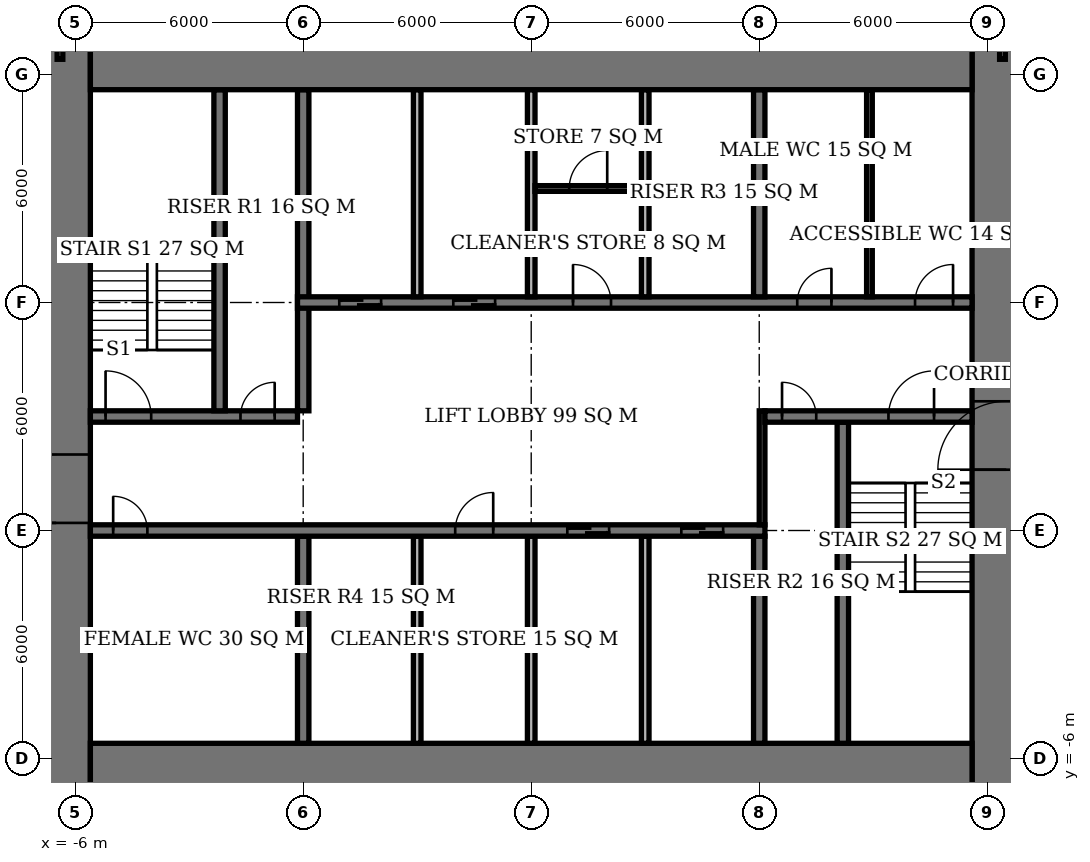
"""IFC4 building model, lengths in metres.
Left out: names, types, materials, properties, quantities, classifications, styles, units other than length and angle.
Written with IfcOpenShell. Run it as: python <this file> out.ifc"""

import sys

from ifc_helpers import new_model, si_unit, direction, frame, frame_2d, origin, place, context, subcontext, project, spatial, rectangle, extrude, element, fill, save


model = new_model("IFC4")
c1 = context("Model", 3, precision=1e-05, world=origin(), true_north=direction((0.0, 1.0)))
c2 = subcontext(c1, "Body", "Model", "MODEL_VIEW")
j1 = project(units=[si_unit("LENGTHUNIT", "METRE"), si_unit("PLANEANGLEUNIT", "RADIAN")], contexts=[c1])
p1 = place(None, origin())
s1 = spatial("IfcSite", under=j1, at=p1, CompositionType="ELEMENT")
p2 = place(p1, origin())
s2 = spatial("IfcBuilding", under=s1, at=p2, CompositionType="ELEMENT")
p3 = place(p2, frame((0.0, 0.0, 208.4)))
s3 = spatial("IfcBuildingStorey", under=s2, at=p3, CompositionType="ELEMENT", Elevation=208.4)
for number, where, z_axis, x_axis in (
    (1, (-5.6, -6.6, 0.0), (0.0, 0.0, 1.0), (1.0, 0.0, 0.0)),
    (2, (-5.6, 12.6, 0.0), (0.0, 0.0, 1.0), (1.0, 0.0, 0.0)),
):
    element("IfcWall", number, at=place(p3, frame(where, z_axis=z_axis, x_axis=x_axis)), inside=s3, PredefinedType="SHEAR", context=c2, shape_type="SweptSolid", body=[
        extrude(rectangle(XDim=23.2, YDim=2.0, at=frame_2d((11.6, 0.0))), origin(), (0.0, 0.0, 1.0), 3.9),
    ])
p4 = place(p3, frame((-6.5, -7.6, 0.0), z_axis=(0.0, 0.0, 1.0), x_axis=(0.0, 1.0, 0.0)))
e3 = element("IfcWall", 3, at=p4, inside=s3, PredefinedType="SHEAR", context=c2, shape_type="SweptSolid", body=[
    extrude(rectangle(XDim=21.2, YDim=1.8, at=frame_2d((10.6, 0.0))), origin(), (0.0, 0.0, 1.0), 3.9),
])
p5 = place(p4, frame((7.8, 0.0, 0.0)))
e4 = element("IfcOpeningElement", 4, at=p5, cuts=e3, PredefinedType="OPENING", context=c2, shape_type="SweptSolid", body=[
    extrude(rectangle(XDim=1.8, YDim=2.4, at=frame_2d((0.9, 1.2))), frame((0.0, 0.91, 0.0), z_axis=(0.0, -1.0, 0.0), x_axis=(1.0, 0.0, 0.0)), (0.0, 0.0, 1.0), 1.82),
])
p6 = place(p3, frame((18.5, -7.6, 0.0), z_axis=(0.0, 0.0, 1.0), x_axis=(0.0, 1.0, 0.0)))
e5 = element("IfcWall", 5, at=p6, inside=s3, PredefinedType="SHEAR", context=c2, shape_type="SweptSolid", body=[
    extrude(rectangle(XDim=21.2, YDim=1.8, at=frame_2d((10.6, 0.0))), origin(), (0.0, 0.0, 1.0), 3.9),
])
p7 = place(p6, frame((9.2, 0.0, 0.0)))
e6 = element("IfcOpeningElement", 6, at=p7, cuts=e5, PredefinedType="OPENING", context=c2, shape_type="SweptSolid", body=[
    extrude(rectangle(XDim=1.8, YDim=2.4, at=frame_2d((0.9, 1.2))), frame((0.0, 0.91, 0.0), z_axis=(0.0, -1.0, 0.0), x_axis=(1.0, 0.0, 0.0)), (0.0, 0.0, 1.0), 1.82),
])
p8 = place(p3, frame((-5.6, 0.0, 0.0), z_axis=(0.0, 0.0, 1.0), x_axis=(1.0, 0.0, 0.0)))
e7 = element("IfcWall", 7, at=p8, inside=s3, PredefinedType="SHEAR", context=c2, shape_type="SweptSolid", body=[
    extrude(rectangle(XDim=17.75, YDim=0.3, at=frame_2d((8.875, 0.0))), origin(), (0.0, 0.0, 1.0), 3.9),
])
p9 = place(p8, frame((0.6, 0.0, 0.0)))
e8 = element("IfcOpeningElement", 8, at=p9, cuts=e7, PredefinedType="OPENING", context=c2, shape_type="SweptSolid", body=[
    extrude(rectangle(XDim=0.9, YDim=2.1, at=frame_2d((0.45, 1.05))), frame((0.0, 0.16, 0.0), z_axis=(0.0, -1.0, 0.0), x_axis=(1.0, 0.0, 0.0)), (0.0, 0.0, 1.0), 0.32),
])
p10 = place(p8, frame((9.6, 0.0, 0.0)))
e9 = element("IfcOpeningElement", 9, at=p10, cuts=e7, PredefinedType="OPENING", context=c2, shape_type="SweptSolid", body=[
    extrude(rectangle(XDim=1.0, YDim=2.1, at=frame_2d((0.5, 1.05))), frame((0.0, 0.16, 0.0), z_axis=(0.0, -1.0, 0.0), x_axis=(1.0, 0.0, 0.0)), (0.0, 0.0, 1.0), 0.32),
])
p11 = place(p8, frame((12.55, 0.0, 0.0)))
e10 = element("IfcOpeningElement", 10, at=p11, cuts=e7, PredefinedType="OPENING", context=c2, shape_type="SweptSolid", body=[
    extrude(rectangle(XDim=1.1, YDim=2.1, at=frame_2d((0.55, 1.05))), frame((0.0, 0.16, 0.0), z_axis=(0.0, -1.0, 0.0), x_axis=(1.0, 0.0, 0.0)), (0.0, 0.0, 1.0), 0.32),
])
p12 = place(p8, frame((15.55, 0.0, 0.0)))
e11 = element("IfcOpeningElement", 11, at=p12, cuts=e7, PredefinedType="OPENING", context=c2, shape_type="SweptSolid", body=[
    extrude(rectangle(XDim=1.1, YDim=2.1, at=frame_2d((0.55, 1.05))), frame((0.0, 0.16, 0.0), z_axis=(0.0, -1.0, 0.0), x_axis=(1.0, 0.0, 0.0)), (0.0, 0.0, 1.0), 0.32),
])
p13 = place(p3, frame((-5.6, 3.0, 0.0), z_axis=(0.0, 0.0, 1.0), x_axis=(1.0, 0.0, 0.0)))
e12 = element("IfcWall", 12, at=p13, inside=s3, PredefinedType="SHEAR", context=c2, shape_type="SweptSolid", body=[
    extrude(rectangle(XDim=5.45, YDim=0.3, at=frame_2d((2.725, 0.0))), origin(), (0.0, 0.0, 1.0), 3.9),
])
p14 = place(p13, frame((0.4, 0.0, 0.0)))
e13 = element("IfcOpeningElement", 13, at=p14, cuts=e12, PredefinedType="OPENING", context=c2, shape_type="SweptSolid", body=[
    extrude(rectangle(XDim=1.2, YDim=2.1, at=frame_2d((0.6, 1.05))), frame((0.0, 0.16, 0.0), z_axis=(0.0, -1.0, 0.0), x_axis=(1.0, 0.0, 0.0)), (0.0, 0.0, 1.0), 0.32),
])
p15 = place(p13, frame((3.95, 0.0, 0.0)))
e14 = element("IfcOpeningElement", 14, at=p15, cuts=e12, PredefinedType="OPENING", context=c2, shape_type="SweptSolid", body=[
    extrude(rectangle(XDim=0.9, YDim=2.1, at=frame_2d((0.45, 1.05))), frame((0.0, 0.16, 0.0), z_axis=(0.0, -1.0, 0.0), x_axis=(1.0, 0.0, 0.0)), (0.0, 0.0, 1.0), 0.32),
])
p16 = place(p3, frame((12.15, 3.0, 0.0), z_axis=(0.0, 0.0, 1.0), x_axis=(1.0, 0.0, 0.0)))
e15 = element("IfcWall", 15, at=p16, inside=s3, PredefinedType="SHEAR", context=c2, shape_type="SweptSolid", body=[
    extrude(rectangle(XDim=5.45, YDim=0.3, at=frame_2d((2.725, 0.0))), origin(), (0.0, 0.0, 1.0), 3.9),
])
p17 = place(p16, frame((3.25, 0.0, 0.0)))
e16 = element("IfcOpeningElement", 16, at=p17, cuts=e15, PredefinedType="OPENING", context=c2, shape_type="SweptSolid", body=[
    extrude(rectangle(XDim=1.2, YDim=2.1, at=frame_2d((0.6, 1.05))), frame((0.0, 0.16, 0.0), z_axis=(0.0, -1.0, 0.0), x_axis=(1.0, 0.0, 0.0)), (0.0, 0.0, 1.0), 0.32),
])
p18 = place(p16, frame((0.45, 0.0, 0.0)))
e17 = element("IfcOpeningElement", 17, at=p18, cuts=e15, PredefinedType="OPENING", context=c2, shape_type="SweptSolid", body=[
    extrude(rectangle(XDim=0.9, YDim=2.1, at=frame_2d((0.45, 1.05))), frame((0.0, 0.16, 0.0), z_axis=(0.0, -1.0, 0.0), x_axis=(1.0, 0.0, 0.0)), (0.0, 0.0, 1.0), 0.32),
])
p19 = place(p3, frame((-0.15, 6.0, 0.0), z_axis=(0.0, 0.0, 1.0), x_axis=(1.0, 0.0, 0.0)))
e18 = element("IfcWall", 18, at=p19, inside=s3, PredefinedType="SHEAR", context=c2, shape_type="SweptSolid", body=[
    extrude(rectangle(XDim=17.75, YDim=0.3, at=frame_2d((8.875, 0.0))), origin(), (0.0, 0.0, 1.0), 3.9),
])
p20 = place(p19, frame((13.15, 0.0, 0.0)))
e19 = element("IfcOpeningElement", 19, at=p20, cuts=e18, PredefinedType="OPENING", context=c2, shape_type="SweptSolid", body=[
    extrude(rectangle(XDim=0.9, YDim=2.1, at=frame_2d((0.45, 1.05))), frame((0.0, 0.16, 0.0), z_axis=(0.0, -1.0, 0.0), x_axis=(1.0, 0.0, 0.0)), (0.0, 0.0, 1.0), 0.32),
])
p21 = place(p19, frame((16.25, 0.0, 0.0)))
e20 = element("IfcOpeningElement", 20, at=p21, cuts=e18, PredefinedType="OPENING", context=c2, shape_type="SweptSolid", body=[
    extrude(rectangle(XDim=1.0, YDim=2.1, at=frame_2d((0.5, 1.05))), frame((0.0, 0.16, 0.0), z_axis=(0.0, -1.0, 0.0), x_axis=(1.0, 0.0, 0.0)), (0.0, 0.0, 1.0), 0.32),
])
p22 = place(p19, frame((7.25, 0.0, 0.0)))
e21 = element("IfcOpeningElement", 21, at=p22, cuts=e18, PredefinedType="OPENING", context=c2, shape_type="SweptSolid", body=[
    extrude(rectangle(XDim=1.0, YDim=2.1, at=frame_2d((0.5, 1.05))), frame((0.0, 0.16, 0.0), z_axis=(0.0, -1.0, 0.0), x_axis=(1.0, 0.0, 0.0)), (0.0, 0.0, 1.0), 0.32),
])
p23 = place(p19, frame((1.1, 0.0, 0.0)))
e22 = element("IfcOpeningElement", 22, at=p23, cuts=e18, PredefinedType="OPENING", context=c2, shape_type="SweptSolid", body=[
    extrude(rectangle(XDim=1.1, YDim=2.1, at=frame_2d((0.55, 1.05))), frame((0.0, 0.16, 0.0), z_axis=(0.0, -1.0, 0.0), x_axis=(1.0, 0.0, 0.0)), (0.0, 0.0, 1.0), 0.32),
])
p24 = place(p19, frame((4.1, 0.0, 0.0)))
e23 = element("IfcOpeningElement", 23, at=p24, cuts=e18, PredefinedType="OPENING", context=c2, shape_type="SweptSolid", body=[
    extrude(rectangle(XDim=1.1, YDim=2.1, at=frame_2d((0.55, 1.05))), frame((0.0, 0.16, 0.0), z_axis=(0.0, -1.0, 0.0), x_axis=(1.0, 0.0, 0.0)), (0.0, 0.0, 1.0), 0.32),
])
p25 = place(p3, frame((0.0, -5.6, 0.0), z_axis=(0.0, 0.0, 1.0), x_axis=(0.0, 1.0, 0.0)))
e24 = element("IfcWall", 24, at=p25, inside=s3, PredefinedType="SHEAR", context=c2, shape_type="SweptSolid", body=[
    extrude(rectangle(XDim=5.45, YDim=0.3, at=frame_2d((2.725, 0.0))), origin(), (0.0, 0.0, 1.0), 3.9),
])
p26 = place(p3, frame((0.0, 3.15, 0.0), z_axis=(0.0, 0.0, 1.0), x_axis=(0.0, 1.0, 0.0)))
e25 = element("IfcWall", 25, at=p26, inside=s3, PredefinedType="SHEAR", context=c2, shape_type="SweptSolid", body=[
    extrude(rectangle(XDim=8.45, YDim=0.3, at=frame_2d((4.225, 0.0))), origin(), (0.0, 0.0, 1.0), 3.9),
])
for number, where, z_axis, x_axis in (
    (26, (12.0, -5.6, 0.0), (0.0, 0.0, 1.0), (0.0, 1.0, 0.0)),
    (27, (12.0, 6.15, 0.0), (0.0, 0.0, 1.0), (0.0, 1.0, 0.0)),
):
    element("IfcWall", number, at=place(p3, frame(where, z_axis=z_axis, x_axis=x_axis)), inside=s3, PredefinedType="SHEAR", context=c2, shape_type="SweptSolid", body=[
        extrude(rectangle(XDim=5.45, YDim=0.3, at=frame_2d((2.725, 0.0))), origin(), (0.0, 0.0, 1.0), 3.9),
    ])
for number, where, z_axis, x_axis in (
    (28, (-2.2, 3.15, 0.0), (0.0, 0.0, 1.0), (0.0, 1.0, 0.0)),
    (29, (14.2, -5.6, 0.0), (0.0, 0.0, 1.0), (0.0, 1.0, 0.0)),
):
    element("IfcWall", number, at=place(p3, frame(where, z_axis=z_axis, x_axis=x_axis)), inside=s3, PredefinedType="SHEAR", context=c2, shape_type="SweptSolid", body=[
        extrude(rectangle(XDim=8.45, YDim=0.3, at=frame_2d((4.225, 0.0))), origin(), (0.0, 0.0, 1.0), 3.9),
    ])
for number, where, z_axis, x_axis in (
    (30, (3.0, 6.15, 0.0), (0.0, 0.0, 1.0), (0.0, 1.0, 0.0)),
    (31, (6.0, 6.15, 0.0), (0.0, 0.0, 1.0), (0.0, 1.0, 0.0)),
    (32, (9.0, 6.15, 0.0), (0.0, 0.0, 1.0), (0.0, 1.0, 0.0)),
    (33, (3.0, -5.6, 0.0), (0.0, 0.0, 1.0), (0.0, 1.0, 0.0)),
    (34, (6.0, -5.6, 0.0), (0.0, 0.0, 1.0), (0.0, 1.0, 0.0)),
    (35, (9.0, -5.6, 0.0), (0.0, 0.0, 1.0), (0.0, 1.0, 0.0)),
):
    element("IfcWall", number, at=place(p3, frame(where, z_axis=z_axis, x_axis=x_axis)), inside=s3, PredefinedType="SOLIDWALL", context=c2, shape_type="SweptSolid", body=[
        extrude(rectangle(XDim=5.45, YDim=0.2, at=frame_2d((2.725, 0.0))), origin(), (0.0, 0.0, 1.0), 3.9),
    ])
p27 = place(p3, frame((14.9, 6.15, 0.0), z_axis=(0.0, 0.0, 1.0), x_axis=(0.0, 1.0, 0.0)))
e36 = element("IfcWall", 36, at=p27, inside=s3, PredefinedType="PLUMBINGWALL", context=c2, shape_type="SweptSolid", body=[
    extrude(rectangle(XDim=5.45, YDim=0.15, at=frame_2d((2.725, 0.0))), origin(), (0.0, 0.0, 1.0), 3.65),
])
p28 = place(p3, frame((6.1, 9.0, 0.0), z_axis=(0.0, 0.0, 1.0), x_axis=(1.0, 0.0, 0.0)))
e37 = element("IfcWall", 37, at=p28, inside=s3, PredefinedType="PARTITIONING", context=c2, shape_type="SweptSolid", body=[
    extrude(rectangle(XDim=2.8, YDim=0.15, at=frame_2d((1.4, 0.0))), origin(), (0.0, 0.0, 1.0), 3.65),
])
p29 = place(p28, frame((0.9, 0.0, 0.0)))
e38 = element("IfcOpeningElement", 38, at=p29, cuts=e37, PredefinedType="OPENING", context=c2, shape_type="SweptSolid", body=[
    extrude(rectangle(XDim=1.0, YDim=2.1, at=frame_2d((0.5, 1.05))), frame((0.0, 0.085, 0.0), z_axis=(0.0, -1.0, 0.0), x_axis=(1.0, 0.0, 0.0)), (0.0, 0.0, 1.0), 0.17),
])
p30 = place(p3, frame((-6.4, 12.4, 0.0), z_axis=(0.0, 0.0, 1.0), x_axis=(0.0, 1.0, 0.0)))
e39 = element("IfcWall", 39, at=p30, inside=s3, PredefinedType="PARTITIONING", context=c2, shape_type="SweptSolid", body=[
    extrude(rectangle(XDim=1.2, YDim=0.15, at=frame_2d((0.6, 0.0))), origin(), (0.0, 0.0, 1.0), 3.65),
])
p31 = place(p3, frame((4.5, 12.4, 0.0), z_axis=(0.0, 0.0, 1.0), x_axis=(0.0, 1.0, 0.0)))
e40 = element("IfcWall", 40, at=p31, inside=s3, PredefinedType="PARTITIONING", context=c2, shape_type="SweptSolid", body=[
    extrude(rectangle(XDim=7.025, YDim=0.15, at=frame_2d((3.513, 0.0))), origin(), (0.0, 0.0, 1.0), 3.65),
])
p32 = place(p3, frame((18.4, 12.4, 0.0), z_axis=(0.0, 0.0, 1.0), x_axis=(0.0, 1.0, 0.0)))
e41 = element("IfcWall", 41, at=p32, inside=s3, PredefinedType="PARTITIONING", context=c2, shape_type="SweptSolid", body=[
    extrude(rectangle(XDim=1.2, YDim=0.15, at=frame_2d((0.6, 0.0))), origin(), (0.0, 0.0, 1.0), 3.65),
])
p33 = place(p3, frame((12.075, 0.15, 0.0), z_axis=(0.0, 0.0, 1.0), x_axis=(0.0, 1.0, 0.0)))
e42 = element("IfcWall", 42, at=p33, inside=s3, PredefinedType="PARTITIONING", context=c2, shape_type="SweptSolid", body=[
    extrude(rectangle(XDim=3.0, YDim=0.15, at=frame_2d((1.5, 0.0))), origin(), (0.0, 0.0, 1.0), 3.65),
])
p34 = place(p5, origin())
e43 = element("IfcDoor", 43, at=p34, inside=s3, OperationType="DOUBLE_DOOR_SINGLE_SWING", PredefinedType="DOOR", context=c2, shape_type="SweptSolid", body=[
    extrude(rectangle(XDim=1.8, YDim=2.4, at=frame_2d((0.9, 1.2))), frame((0.0, 0.025, 0.0), z_axis=(0.0, -1.0, 0.0), x_axis=(1.0, 0.0, 0.0)), (0.0, 0.0, 1.0), 0.05),
])
fill(e4, e43)
p35 = place(p7, origin())
e44 = element("IfcDoor", 44, at=p35, inside=s3, OperationType="DOUBLE_DOOR_SINGLE_SWING", PredefinedType="DOOR", context=c2, shape_type="SweptSolid", body=[
    extrude(rectangle(XDim=1.8, YDim=2.4, at=frame_2d((0.9, 1.2))), frame((0.0, 0.025, 0.0), z_axis=(0.0, -1.0, 0.0), x_axis=(1.0, 0.0, 0.0)), (0.0, 0.0, 1.0), 0.05),
])
fill(e6, e44)
p36 = place(p14, origin())
e45 = element("IfcDoor", 45, at=p36, inside=s3, OperationType="SINGLE_SWING_LEFT", PredefinedType="DOOR", context=c2, shape_type="SweptSolid", body=[
    extrude(rectangle(XDim=1.2, YDim=2.1, at=frame_2d((0.6, 1.05))), frame((0.0, 0.025, 0.0), z_axis=(0.0, -1.0, 0.0), x_axis=(1.0, 0.0, 0.0)), (0.0, 0.0, 1.0), 0.05),
])
fill(e13, e45)
p37 = place(p15, origin())
e46 = element("IfcDoor", 46, at=p37, inside=s3, OperationType="SINGLE_SWING_RIGHT", PredefinedType="DOOR", context=c2, shape_type="SweptSolid", body=[
    extrude(rectangle(XDim=0.9, YDim=2.1, at=frame_2d((0.45, 1.05))), frame((0.0, 0.025, 0.0), z_axis=(0.0, -1.0, 0.0), x_axis=(1.0, 0.0, 0.0)), (0.0, 0.0, 1.0), 0.05),
])
fill(e14, e46)
p38 = place(p17, origin())
e47 = element("IfcDoor", 47, at=p38, inside=s3, OperationType="SINGLE_SWING_RIGHT", PredefinedType="DOOR", context=c2, shape_type="SweptSolid", body=[
    extrude(rectangle(XDim=1.2, YDim=2.1, at=frame_2d((0.6, 1.05))), frame((0.0, 0.025, 0.0), z_axis=(0.0, -1.0, 0.0), x_axis=(1.0, 0.0, 0.0)), (0.0, 0.0, 1.0), 0.05),
])
fill(e16, e47)
p39 = place(p18, origin())
e48 = element("IfcDoor", 48, at=p39, inside=s3, OperationType="SINGLE_SWING_LEFT", PredefinedType="DOOR", context=c2, shape_type="SweptSolid", body=[
    extrude(rectangle(XDim=0.9, YDim=2.1, at=frame_2d((0.45, 1.05))), frame((0.0, 0.025, 0.0), z_axis=(0.0, -1.0, 0.0), x_axis=(1.0, 0.0, 0.0)), (0.0, 0.0, 1.0), 0.05),
])
fill(e17, e48)
p40 = place(p9, origin())
e49 = element("IfcDoor", 49, at=p40, inside=s3, OperationType="SINGLE_SWING_LEFT", PredefinedType="DOOR", context=c2, shape_type="SweptSolid", body=[
    extrude(rectangle(XDim=0.9, YDim=2.1, at=frame_2d((0.45, 1.05))), frame((0.0, 0.025, 0.0), z_axis=(0.0, -1.0, 0.0), x_axis=(1.0, 0.0, 0.0)), (0.0, 0.0, 1.0), 0.05),
])
fill(e8, e49)
p41 = place(p20, origin())
e50 = element("IfcDoor", 50, at=p41, inside=s3, OperationType="SINGLE_SWING_RIGHT", PredefinedType="DOOR", context=c2, shape_type="SweptSolid", body=[
    extrude(rectangle(XDim=0.9, YDim=2.1, at=frame_2d((0.45, 1.05))), frame((0.0, 0.025, 0.0), z_axis=(0.0, -1.0, 0.0), x_axis=(1.0, 0.0, 0.0)), (0.0, 0.0, 1.0), 0.05),
])
fill(e19, e50)
p42 = place(p21, origin())
e51 = element("IfcDoor", 51, at=p42, inside=s3, OperationType="SINGLE_SWING_RIGHT", PredefinedType="DOOR", context=c2, shape_type="SweptSolid", body=[
    extrude(rectangle(XDim=1.0, YDim=2.1, at=frame_2d((0.5, 1.05))), frame((0.0, 0.025, 0.0), z_axis=(0.0, -1.0, 0.0), x_axis=(1.0, 0.0, 0.0)), (0.0, 0.0, 1.0), 0.05),
])
fill(e20, e51)
p43 = place(p29, origin())
e52 = element("IfcDoor", 52, at=p43, inside=s3, OperationType="SINGLE_SWING_RIGHT", PredefinedType="DOOR", context=c2, shape_type="SweptSolid", body=[
    extrude(rectangle(XDim=1.0, YDim=2.1, at=frame_2d((0.5, 1.05))), frame((0.0, 0.025, 0.0), z_axis=(0.0, -1.0, 0.0), x_axis=(1.0, 0.0, 0.0)), (0.0, 0.0, 1.0), 0.05),
])
fill(e38, e52)
p44 = place(p22, origin())
e53 = element("IfcDoor", 53, at=p44, inside=s3, OperationType="SINGLE_SWING_LEFT", PredefinedType="DOOR", context=c2, shape_type="SweptSolid", body=[
    extrude(rectangle(XDim=1.0, YDim=2.1, at=frame_2d((0.5, 1.05))), frame((0.0, 0.025, 0.0), z_axis=(0.0, -1.0, 0.0), x_axis=(1.0, 0.0, 0.0)), (0.0, 0.0, 1.0), 0.05),
])
fill(e21, e53)
p45 = place(p10, origin())
e54 = element("IfcDoor", 54, at=p45, inside=s3, OperationType="SINGLE_SWING_RIGHT", PredefinedType="DOOR", context=c2, shape_type="SweptSolid", body=[
    extrude(rectangle(XDim=1.0, YDim=2.1, at=frame_2d((0.5, 1.05))), frame((0.0, 0.025, 0.0), z_axis=(0.0, -1.0, 0.0), x_axis=(1.0, 0.0, 0.0)), (0.0, 0.0, 1.0), 0.05),
])
fill(e9, e54)
p46 = place(p23, origin())
e55 = element("IfcDoor", 55, at=p46, inside=s3, OperationType="DOUBLE_DOOR_SLIDING", PredefinedType="USERDEFINED", context=c2, shape_type="SweptSolid", body=[
    extrude(rectangle(XDim=1.1, YDim=2.1, at=frame_2d((0.55, 1.05))), frame((0.0, 0.025, 0.0), z_axis=(0.0, -1.0, 0.0), x_axis=(1.0, 0.0, 0.0)), (0.0, 0.0, 1.0), 0.05),
])
fill(e22, e55)
p47 = place(p24, origin())
e56 = element("IfcDoor", 56, at=p47, inside=s3, OperationType="DOUBLE_DOOR_SLIDING", PredefinedType="USERDEFINED", context=c2, shape_type="SweptSolid", body=[
    extrude(rectangle(XDim=1.1, YDim=2.1, at=frame_2d((0.55, 1.05))), frame((0.0, 0.025, 0.0), z_axis=(0.0, -1.0, 0.0), x_axis=(1.0, 0.0, 0.0)), (0.0, 0.0, 1.0), 0.05),
])
fill(e23, e56)
p48 = place(p11, origin())
e57 = element("IfcDoor", 57, at=p48, inside=s3, OperationType="DOUBLE_DOOR_SLIDING", PredefinedType="USERDEFINED", context=c2, shape_type="SweptSolid", body=[
    extrude(rectangle(XDim=1.1, YDim=2.1, at=frame_2d((0.55, 1.05))), frame((0.0, 0.025, 0.0), z_axis=(0.0, -1.0, 0.0), x_axis=(1.0, 0.0, 0.0)), (0.0, 0.0, 1.0), 0.05),
])
fill(e10, e57)
p49 = place(p12, origin())
e58 = element("IfcDoor", 58, at=p49, inside=s3, OperationType="DOUBLE_DOOR_SLIDING", PredefinedType="USERDEFINED", context=c2, shape_type="SweptSolid", body=[
    extrude(rectangle(XDim=1.1, YDim=2.1, at=frame_2d((0.55, 1.05))), frame((0.0, 0.025, 0.0), z_axis=(0.0, -1.0, 0.0), x_axis=(1.0, 0.0, 0.0)), (0.0, 0.0, 1.0), 0.05),
])
fill(e11, e58)
save(model, sys.argv[1])
